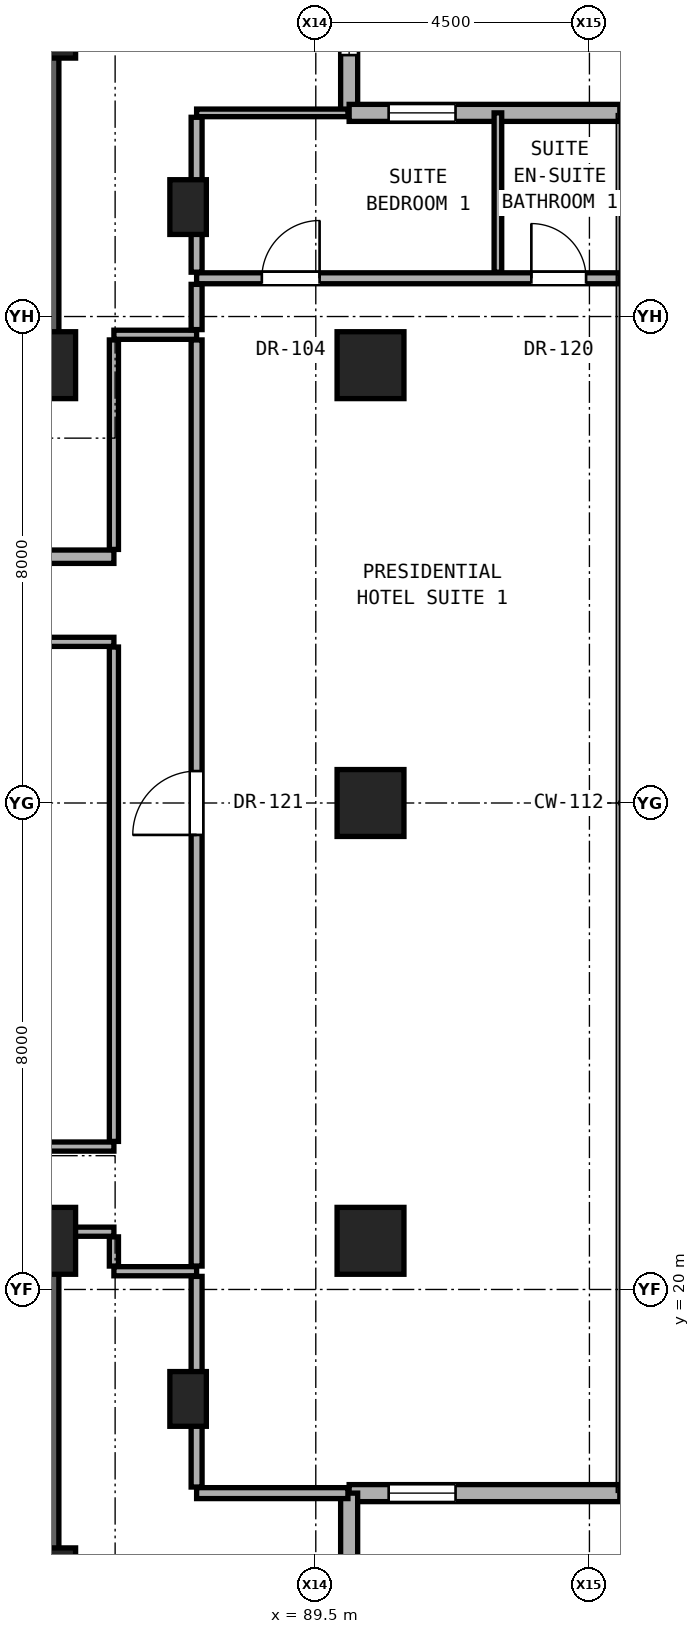
"""IFC4 building model, lengths in metres.
Left out: names, types, materials, properties, quantities, classifications, styles, units other than length and angle.
Written with IfcOpenShell. Run it as: python <this file> out.ifc"""

import sys

from ifc_helpers import new_model, si_unit, direction, frame, frame_2d, origin, origin_2d, place, context, subcontext, project, spatial, rectangle, hollow_rectangle, extrude, element, fill, save


model = new_model("IFC4")
c1 = context("Model", 3, precision=1e-05, world=origin(), true_north=direction((0.0, 1.0)))
c2 = subcontext(c1, "Body", "Model", "MODEL_VIEW")
j1 = project(units=[si_unit("LENGTHUNIT", "METRE"), si_unit("PLANEANGLEUNIT", "RADIAN")], contexts=[c1])
p1 = place(None, origin())
s1 = spatial("IfcSite", under=j1, at=p1, CompositionType="ELEMENT")
p2 = place(p1, origin())
s2 = spatial("IfcBuilding", under=s1, at=p2, CompositionType="ELEMENT")
p3 = place(p2, frame((0.0, 0.0, 134.6)))
s3 = spatial("IfcBuildingStorey", under=s2, at=p3, CompositionType="ELEMENT", Elevation=134.6)
for number, where, z_axis, x_axis in (
    (1, (85.0, 15.2, 0.0), (0.0, 0.0, 1.0), (1.0, 0.0, 0.0)),
    (2, (85.0, 20.8, 0.0), (0.0, 0.0, 1.0), (1.0, 0.0, 0.0)),
    (3, (85.0, 35.2, 0.0), (0.0, 0.0, 1.0), (1.0, 0.0, 0.0)),
    (4, (85.0, 40.8, 0.0), (0.0, 0.0, 1.0), (1.0, 0.0, 0.0)),
):
    element("IfcColumn", number, at=place(p3, frame(where, z_axis=z_axis, x_axis=x_axis)), inside=s3, PredefinedType="COLUMN", context=c2, shape_type="SweptSolid", body=[
        extrude(rectangle(XDim=1.1, YDim=1.1, at=origin_2d()), origin(), (0.0, 0.0, 1.0), 3.3),
    ])
for number, where, z_axis, x_axis in (
    (5, (90.4, 20.8, 0.0), (0.0, 0.0, 1.0), (1.0, 0.0, 0.0)),
    (6, (90.4, 28.0, 0.0), (0.0, 0.0, 1.0), (1.0, 0.0, 0.0)),
    (7, (90.4, 35.2, 0.0), (0.0, 0.0, 1.0), (1.0, 0.0, 0.0)),
):
    element("IfcColumn", number, at=place(p3, frame(where, z_axis=z_axis, x_axis=x_axis)), inside=s3, PredefinedType="COLUMN", context=c2, shape_type="SweptSolid", body=[
        extrude(hollow_rectangle(XDim=1.1, YDim=1.1, WallThickness=0.06, at=origin_2d()), origin(), (0.0, 0.0, 1.0), 3.3),
    ])
for number, where, z_axis, x_axis in (
    (8, (87.4, 18.2, 0.0), (0.0, 0.0, 1.0), (1.0, 0.0, 0.0)),
    (9, (87.4, 37.8, 0.0), (0.0, 0.0, 1.0), (1.0, 0.0, 0.0)),
):
    element("IfcColumn", number, at=place(p3, frame(where, z_axis=z_axis, x_axis=x_axis)), inside=s3, PredefinedType="PILASTER", context=c2, shape_type="SweptSolid", body=[
        extrude(rectangle(XDim=0.6, YDim=0.9, at=origin_2d()), origin(), (0.0, 0.0, 1.0), 3.3),
    ])
for number, where, z_axis, x_axis in (
    (10, (85.0, 35.2, 0.0), (0.0, 0.0, 1.0), (0.0, 1.0, 0.0)),
    (11, (85.0, 15.2, 0.0), (0.0, 0.0, 1.0), (0.0, 1.0, 0.0)),
):
    element("IfcWall", number, at=place(p3, frame(where, z_axis=z_axis, x_axis=x_axis)), inside=s3, PredefinedType="SHEAR", context=c2, shape_type="SweptSolid", body=[
        extrude(rectangle(XDim=5.6, YDim=0.55, at=frame_2d((2.8, 0.0))), origin(), (0.0, 0.0, 1.0), 3.08),
    ])
p4 = place(p3, frame((90.049, 39.349, 0.0), z_axis=(0.0, 0.0, 1.0), x_axis=(0.0, 1.0, 0.0)))
e12 = element("IfcWall", 12, at=p4, inside=s3, PredefinedType="SOLIDWALL", context=c2, shape_type="SweptSolid", body=[
    extrude(rectangle(XDim=4.486, YDim=0.28, at=frame_2d((2.243, 0.0))), origin(), (0.0, 0.0, 1.0), 3.06),
])
p5 = place(p4, frame((0.95, 0.0, 0.85)))
e13 = element("IfcOpeningElement", 13, at=p5, cuts=e12, PredefinedType="OPENING", context=c2, shape_type="SweptSolid", body=[
    extrude(rectangle(XDim=1.1, YDim=2.0, at=frame_2d((0.55, 1.0))), frame((0.0, 0.15, 0.0), z_axis=(0.0, -1.0, 0.0), x_axis=(1.0, 0.0, 0.0)), (0.0, 0.0, 1.0), 0.3),
])
p6 = place(p3, frame((90.049, 16.651, 0.0), z_axis=(0.0, 0.0, 1.0), x_axis=(1.0, 0.0, 0.0)))
e14 = element("IfcWall", 14, at=p6, inside=s3, PredefinedType="SOLIDWALL", context=c2, shape_type="SweptSolid", body=[
    extrude(rectangle(XDim=4.486, YDim=0.28, at=frame_2d((2.243, 0.0))), origin(), (0.0, 0.0, 1.0), 3.06),
])
p7 = place(p6, frame((0.65, 0.0, 0.85)))
e15 = element("IfcOpeningElement", 15, at=p7, cuts=e14, PredefinedType="OPENING", context=c2, shape_type="SweptSolid", body=[
    extrude(rectangle(XDim=1.1, YDim=2.0, at=frame_2d((0.55, 1.0))), frame((0.0, 0.15, 0.0), z_axis=(0.0, -1.0, 0.0), x_axis=(1.0, 0.0, 0.0)), (0.0, 0.0, 1.0), 0.3),
])
p8 = place(p3, frame((90.049, 12.165, 0.0), z_axis=(0.0, 0.0, 1.0), x_axis=(0.0, 1.0, 0.0)))
e16 = element("IfcWall", 16, at=p8, inside=s3, PredefinedType="SOLIDWALL", context=c2, shape_type="SweptSolid", body=[
    extrude(rectangle(XDim=4.486, YDim=0.28, at=frame_2d((2.243, 0.0))), origin(), (0.0, 0.0, 1.0), 3.06),
])
p9 = place(p3, frame((94.535, 39.349, 0.0), z_axis=(0.0, 0.0, 1.0), x_axis=(-1.0, 0.0, 0.0)))
e17 = element("IfcWall", 17, at=p9, inside=s3, PredefinedType="SOLIDWALL", context=c2, shape_type="SweptSolid", body=[
    extrude(rectangle(XDim=4.486, YDim=0.28, at=frame_2d((2.243, 0.0))), origin(), (0.0, 0.0, 1.0), 3.06),
])
p10 = place(p9, frame((2.737, 0.0, 0.85)))
e18 = element("IfcOpeningElement", 18, at=p10, cuts=e17, PredefinedType="OPENING", context=c2, shape_type="SweptSolid", body=[
    extrude(rectangle(XDim=1.1, YDim=2.0, at=frame_2d((0.55, 1.0))), frame((0.0, 0.15, 0.0), z_axis=(0.0, -1.0, 0.0), x_axis=(1.0, 0.0, 0.0)), (0.0, 0.0, 1.0), 0.3),
])
p11 = place(p3, frame((87.54, 16.651, 0.0), z_axis=(0.0, 0.0, 1.0), x_axis=(1.0, 0.0, 0.0)))
e19 = element("IfcWall", 19, at=p11, inside=s3, PredefinedType="PARTITIONING", context=c2, shape_type="SweptSolid", body=[
    extrude(rectangle(XDim=2.489, YDim=0.18, at=frame_2d((1.244, 0.0))), origin(), (0.0, 0.0, 1.0), 3.08),
])
p12 = place(p3, frame((86.18, 20.3, 0.0), z_axis=(0.0, 0.0, 1.0), x_axis=(1.0, 0.0, 0.0)))
e20 = element("IfcWall", 20, at=p12, inside=s3, PredefinedType="PARTITIONING", context=c2, shape_type="SweptSolid", body=[
    extrude(rectangle(XDim=1.36, YDim=0.15, at=frame_2d((0.68, 0.0))), origin(), (0.0, 0.0, 1.0), 3.08),
])
p13 = place(p3, frame((85.27, 20.95, 0.0), z_axis=(0.0, 0.0, 1.0), x_axis=(1.0, 0.0, 0.0)))
e21 = element("IfcWall", 21, at=p13, inside=s3, PredefinedType="PARTITIONING", context=c2, shape_type="SweptSolid", body=[
    extrude(rectangle(XDim=0.91, YDim=0.15, at=frame_2d((0.455, 0.0))), origin(), (0.0, 0.0, 1.0), 2.472),
])
p14 = place(p3, frame((66.68, 22.35, 0.0), z_axis=(0.0, 0.0, 1.0), x_axis=(1.0, 0.0, 0.0)))
e22 = element("IfcWall", 22, at=p14, inside=s3, PredefinedType="PARTITIONING", context=c2, shape_type="SweptSolid", body=[
    extrude(rectangle(XDim=19.5, YDim=0.15, at=frame_2d((9.75, 0.0))), origin(), (0.0, 0.0, 1.0), 2.216),
])
p15 = place(p14, frame((7.954, 0.0, 0.0)))
e23 = element("IfcOpeningElement", 23, at=p15, cuts=e22, PredefinedType="OPENING", context=c2, shape_type="SweptSolid", body=[
    extrude(rectangle(XDim=1.05, YDim=2.2, at=frame_2d((0.525, 1.1))), frame((0.0, 0.085, 0.0), z_axis=(0.0, -1.0, 0.0), x_axis=(1.0, 0.0, 0.0)), (0.0, 0.0, 1.0), 0.17),
])
p16 = place(p3, frame((66.68, 30.65, 0.0), z_axis=(0.0, 0.0, 1.0), x_axis=(1.0, 0.0, 0.0)))
e24 = element("IfcWall", 24, at=p16, inside=s3, PredefinedType="PARTITIONING", context=c2, shape_type="SweptSolid", body=[
    extrude(rectangle(XDim=19.5, YDim=0.15, at=frame_2d((9.75, 0.0))), origin(), (0.0, 0.0, 1.0), 2.216),
])
p17 = place(p16, frame((3.745, 0.0, 0.0)))
e25 = element("IfcOpeningElement", 25, at=p17, cuts=e24, PredefinedType="OPENING", context=c2, shape_type="SweptSolid", body=[
    extrude(rectangle(XDim=0.95, YDim=2.15, at=frame_2d((0.475, 1.075))), frame((0.0, 0.085, 0.0), z_axis=(0.0, -1.0, 0.0), x_axis=(1.0, 0.0, 0.0)), (0.0, 0.0, 1.0), 0.17),
])
p18 = place(p16, frame((14.999, 0.0, 0.0)))
e26 = element("IfcOpeningElement", 26, at=p18, cuts=e24, PredefinedType="OPENING", context=c2, shape_type="SweptSolid", body=[
    extrude(rectangle(XDim=1.05, YDim=2.2, at=frame_2d((0.525, 1.1))), frame((0.0, 0.085, 0.0), z_axis=(0.0, -1.0, 0.0), x_axis=(1.0, 0.0, 0.0)), (0.0, 0.0, 1.0), 0.17),
])
p19 = place(p3, frame((71.55, 32.05, 0.0), z_axis=(0.0, 0.0, 1.0), x_axis=(1.0, 0.0, 0.0)))
e27 = element("IfcWall", 27, at=p19, inside=s3, PredefinedType="SOLIDWALL", context=c2, shape_type="SweptSolid", body=[
    extrude(rectangle(XDim=14.63, YDim=0.22, at=frame_2d((7.315, 0.0))), origin(), (0.0, 0.0, 1.0), 2.216),
])
p20 = place(p19, frame((6.065, 0.0, 0.0)))
e28 = element("IfcOpeningElement", 28, at=p20, cuts=e27, PredefinedType="OPENING", context=c2, shape_type="SweptSolid", body=[
    extrude(rectangle(XDim=0.85, YDim=2.01, at=frame_2d((0.425, 1.005))), frame((0.0, 0.12, 0.0), z_axis=(0.0, -1.0, 0.0), x_axis=(1.0, 0.0, 0.0)), (0.0, 0.0, 1.0), 0.24),
])
p21 = place(p19, frame((10.535, 0.0, 0.0)))
e29 = element("IfcOpeningElement", 29, at=p21, cuts=e27, PredefinedType="OPENING", context=c2, shape_type="SweptSolid", body=[
    extrude(rectangle(XDim=0.95, YDim=2.15, at=frame_2d((0.475, 1.075))), frame((0.0, 0.12, 0.0), z_axis=(0.0, -1.0, 0.0), x_axis=(1.0, 0.0, 0.0)), (0.0, 0.0, 1.0), 0.24),
])
p22 = place(p19, frame((1.65, 0.0, 0.0)))
e30 = element("IfcOpeningElement", 30, at=p22, cuts=e27, PredefinedType="OPENING", context=c2, shape_type="SweptSolid", body=[
    extrude(rectangle(XDim=0.85, YDim=2.01, at=frame_2d((0.425, 1.005))), frame((0.0, 0.12, 0.0), z_axis=(0.0, -1.0, 0.0), x_axis=(1.0, 0.0, 0.0)), (0.0, 0.0, 1.0), 0.24),
])
p23 = place(p3, frame((86.18, 35.7, 0.0), z_axis=(0.0, 0.0, 1.0), x_axis=(1.0, 0.0, 0.0)))
e31 = element("IfcWall", 31, at=p23, inside=s3, PredefinedType="PARTITIONING", context=c2, shape_type="SweptSolid", body=[
    extrude(rectangle(XDim=1.36, YDim=0.15, at=frame_2d((0.68, 0.0))), origin(), (0.0, 0.0, 1.0), 3.08),
])
p24 = place(p3, frame((87.54, 36.629, 0.0), z_axis=(0.0, 0.0, 1.0), x_axis=(1.0, 0.0, 0.0)))
e32 = element("IfcWall", 32, at=p24, inside=s3, PredefinedType="PARTITIONING", context=c2, shape_type="SweptSolid", body=[
    extrude(rectangle(XDim=6.995, YDim=0.18, at=frame_2d((3.498, 0.0))), origin(), (0.0, 0.0, 1.0), 2.523),
])
p25 = place(p24, frame((1.073, 0.0, 0.0)))
e33 = element("IfcOpeningElement", 33, at=p25, cuts=e32, PredefinedType="OPENING", context=c2, shape_type="SweptSolid", body=[
    extrude(rectangle(XDim=0.95, YDim=2.15, at=frame_2d((0.475, 1.075))), frame((0.0, 0.1, 0.0), z_axis=(0.0, -1.0, 0.0), x_axis=(1.0, 0.0, 0.0)), (0.0, 0.0, 1.0), 0.2),
])
p26 = place(p24, frame((5.505, 0.0, 0.0)))
e34 = element("IfcOpeningElement", 34, at=p26, cuts=e32, PredefinedType="OPENING", context=c2, shape_type="SweptSolid", body=[
    extrude(rectangle(XDim=0.9, YDim=2.1, at=frame_2d((0.45, 1.05))), frame((0.0, 0.1, 0.0), z_axis=(0.0, -1.0, 0.0), x_axis=(1.0, 0.0, 0.0)), (0.0, 0.0, 1.0), 0.2),
])
p27 = place(p3, frame((87.54, 39.349, 0.0), z_axis=(0.0, 0.0, 1.0), x_axis=(1.0, 0.0, 0.0)))
e35 = element("IfcWall", 35, at=p27, inside=s3, PredefinedType="PARTITIONING", context=c2, shape_type="SweptSolid", body=[
    extrude(rectangle(XDim=2.489, YDim=0.125, at=frame_2d((1.244, 0.0))), origin(), (0.0, 0.0, 1.0), 3.08),
])
p28 = place(p3, frame((86.18, 20.385, 0.0), z_axis=(0.0, 0.0, 1.0), x_axis=(0.0, 1.0, 0.0)))
e36 = element("IfcWall", 36, at=p28, inside=s3, PredefinedType="PARTITIONING", context=c2, shape_type="SweptSolid", body=[
    extrude(rectangle(XDim=0.48, YDim=0.15, at=frame_2d((0.24, 0.0))), origin(), (0.0, 0.0, 1.0), 2.472),
])
p29 = place(p3, frame((86.18, 22.435, 0.0), z_axis=(0.0, 0.0, 1.0), x_axis=(0.0, 1.0, 0.0)))
e37 = element("IfcWall", 37, at=p29, inside=s3, PredefinedType="PARTITIONING", context=c2, shape_type="SweptSolid", body=[
    extrude(rectangle(XDim=8.13, YDim=0.15, at=frame_2d((4.065, 0.0))), origin(), (0.0, 0.0, 1.0), 2.376),
])
p30 = place(p3, frame((86.18, 32.17, 0.0), z_axis=(0.0, 0.0, 1.0), x_axis=(0.0, 1.0, 0.0)))
e38 = element("IfcWall", 38, at=p30, inside=s3, PredefinedType="PARTITIONING", context=c2, shape_type="SweptSolid", body=[
    extrude(rectangle(XDim=3.445, YDim=0.15, at=frame_2d((1.723, 0.0))), origin(), (0.0, 0.0, 1.0), 2.472),
])
p31 = place(p3, frame((87.54, 16.751, 0.0), z_axis=(0.0, 0.0, 1.0), x_axis=(0.0, 1.0, 0.0)))
e39 = element("IfcWall", 39, at=p31, inside=s3, PredefinedType="PARTITIONING", context=c2, shape_type="SweptSolid", body=[
    extrude(rectangle(XDim=3.464, YDim=0.18, at=frame_2d((1.732, 0.0))), origin(), (0.0, 0.0, 1.0), 2.523),
])
p32 = place(p3, frame((87.54, 20.385, 0.0), z_axis=(0.0, 0.0, 1.0), x_axis=(0.0, 1.0, 0.0)))
e40 = element("IfcWall", 40, at=p32, inside=s3, PredefinedType="PARTITIONING", context=c2, shape_type="SweptSolid", body=[
    extrude(rectangle(XDim=15.23, YDim=0.18, at=frame_2d((7.615, 0.0))), origin(), (0.0, 0.0, 1.0), 2.376),
])
p33 = place(p32, frame((7.09, 0.0, 0.0)))
e41 = element("IfcOpeningElement", 41, at=p33, cuts=e40, PredefinedType="OPENING", context=c2, shape_type="SweptSolid", body=[
    extrude(rectangle(XDim=1.05, YDim=2.2, at=frame_2d((0.525, 1.1))), frame((0.0, 0.1, 0.0), z_axis=(0.0, -1.0, 0.0), x_axis=(1.0, 0.0, 0.0)), (0.0, 0.0, 1.0), 0.2),
])
p34 = place(p3, frame((87.54, 35.785, 0.0), z_axis=(0.0, 0.0, 1.0), x_axis=(0.0, 1.0, 0.0)))
e42 = element("IfcWall", 42, at=p34, inside=s3, PredefinedType="PARTITIONING", context=c2, shape_type="SweptSolid", body=[
    extrude(rectangle(XDim=0.744, YDim=0.18, at=frame_2d((0.372, 0.0))), origin(), (0.0, 0.0, 1.0), 3.08),
])
p35 = place(p3, frame((87.54, 36.729, 0.0), z_axis=(0.0, 0.0, 1.0), x_axis=(0.0, 1.0, 0.0)))
e43 = element("IfcWall", 43, at=p35, inside=s3, PredefinedType="PARTITIONING", context=c2, shape_type="SweptSolid", body=[
    extrude(rectangle(XDim=2.548, YDim=0.18, at=frame_2d((1.274, 0.0))), origin(), (0.0, 0.0, 1.0), 2.523),
])
p36 = place(p3, frame((92.495, 36.729, 0.0), z_axis=(0.0, 0.0, 1.0), x_axis=(0.0, 1.0, 0.0)))
e44 = element("IfcWall", 44, at=p36, inside=s3, PredefinedType="PARTITIONING", context=c2, shape_type="SweptSolid", body=[
    extrude(rectangle(XDim=2.62, YDim=0.125, at=frame_2d((1.31, 0.0))), origin(), (0.0, 0.0, 1.0), 3.08),
])
p37 = place(p5, origin())
e45 = element("IfcWindow", 45, at=p37, inside=s3, PartitioningType="SINGLE_PANEL", PredefinedType="WINDOW", context=c2, shape_type="SweptSolid", body=[
    extrude(rectangle(XDim=1.1, YDim=2.0, at=frame_2d((0.55, 1.0))), frame((0.0, 0.03, 0.0), z_axis=(0.0, -1.0, 0.0), x_axis=(1.0, 0.0, 0.0)), (0.0, 0.0, 1.0), 0.06),
])
fill(e13, e45)
p38 = place(p7, origin())
e46 = element("IfcWindow", 46, at=p38, inside=s3, PartitioningType="SINGLE_PANEL", PredefinedType="WINDOW", context=c2, shape_type="SweptSolid", body=[
    extrude(rectangle(XDim=1.1, YDim=2.0, at=frame_2d((0.55, 1.0))), frame((0.0, 0.03, 0.0), z_axis=(0.0, -1.0, 0.0), x_axis=(1.0, 0.0, 0.0)), (0.0, 0.0, 1.0), 0.06),
])
fill(e15, e46)
p39 = place(p10, origin())
e47 = element("IfcWindow", 47, at=p39, inside=s3, PartitioningType="SINGLE_PANEL", PredefinedType="WINDOW", context=c2, shape_type="SweptSolid", body=[
    extrude(rectangle(XDim=1.1, YDim=2.0, at=frame_2d((0.55, 1.0))), frame((0.0, 0.03, 0.0), z_axis=(0.0, -1.0, 0.0), x_axis=(1.0, 0.0, 0.0)), (0.0, 0.0, 1.0), 0.06),
])
fill(e18, e47)
p40 = place(p33, origin())
e48 = element("IfcDoor", 48, at=p40, inside=s3, OperationType="SINGLE_SWING_LEFT", PredefinedType="DOOR", context=c2, shape_type="SweptSolid", body=[
    extrude(rectangle(XDim=1.05, YDim=2.2, at=frame_2d((0.525, 1.1))), frame((0.0, 0.025, 0.0), z_axis=(0.0, -1.0, 0.0), x_axis=(1.0, 0.0, 0.0)), (0.0, 0.0, 1.0), 0.05),
])
fill(e41, e48)
p41 = place(p25, origin())
e49 = element("IfcDoor", 49, at=p41, inside=s3, OperationType="SINGLE_SWING_RIGHT", PredefinedType="DOOR", context=c2, shape_type="SweptSolid", body=[
    extrude(rectangle(XDim=0.95, YDim=2.15, at=frame_2d((0.475, 1.075))), frame((0.0, 0.025, 0.0), z_axis=(0.0, -1.0, 0.0), x_axis=(1.0, 0.0, 0.0)), (0.0, 0.0, 1.0), 0.05),
])
fill(e33, e49)
p42 = place(p26, origin())
e50 = element("IfcDoor", 50, at=p42, inside=s3, OperationType="SINGLE_SWING_LEFT", PredefinedType="DOOR", context=c2, shape_type="SweptSolid", body=[
    extrude(rectangle(XDim=0.9, YDim=2.1, at=frame_2d((0.45, 1.05))), frame((0.0, 0.025, 0.0), z_axis=(0.0, -1.0, 0.0), x_axis=(1.0, 0.0, 0.0)), (0.0, 0.0, 1.0), 0.05),
])
fill(e34, e50)
save(model, sys.argv[1])
